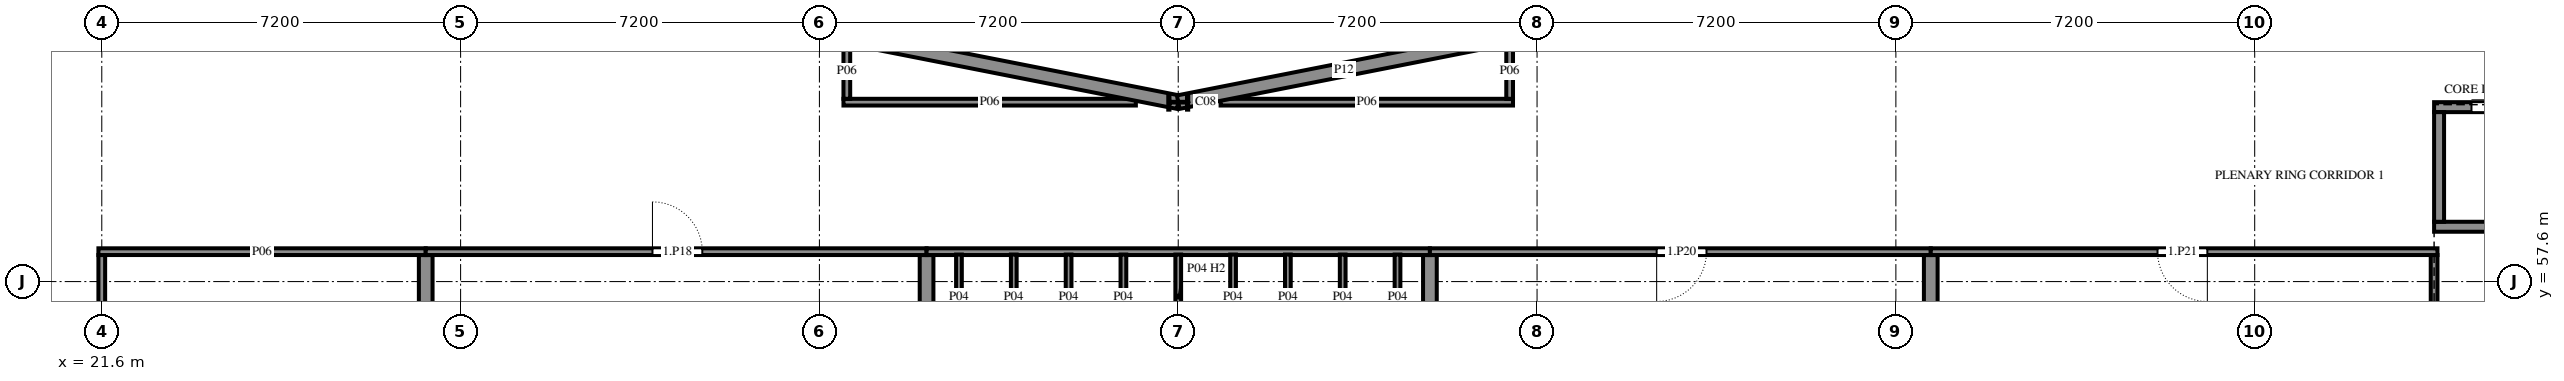
"""IFC4 building model, lengths in metres.
Left out: names, types, materials, properties, quantities, classifications, styles, units other than length and angle.
Written with IfcOpenShell. Run it as: python <this file> out.ifc"""

import sys

from ifc_helpers import new_model, si_unit, direction, frame, frame_2d, origin, origin_2d, place, context, subcontext, project, spatial, rectangle, i_section, extrude, element, fill, save


model = new_model("IFC4")
c1 = context("Model", 3, precision=1e-05, world=origin(), true_north=direction((0.0, 1.0)))
c2 = subcontext(c1, "Body", "Model", "MODEL_VIEW")
j1 = project(units=[si_unit("LENGTHUNIT", "METRE"), si_unit("PLANEANGLEUNIT", "RADIAN")], contexts=[c1])
p1 = place(None, origin())
s1 = spatial("IfcSite", under=j1, at=p1, CompositionType="ELEMENT")
p2 = place(p1, origin())
s2 = spatial("IfcBuilding", under=s1, at=p2, CompositionType="ELEMENT")
p3 = place(p2, frame((0.0, 0.0, 3.6)))
s3 = spatial("IfcBuildingStorey", under=s2, at=p3, CompositionType="ELEMENT", Elevation=3.6)
p4 = place(p3, frame((43.2, 61.2, 0.0), z_axis=(0.0, 0.0, 1.0), x_axis=(0.0, -1.0, 0.0)))
e1 = element("IfcColumn", 1, at=p4, inside=s3, PredefinedType="COLUMN", context=c2, shape_type="SweptSolid", body=[
    extrude(i_section(OverallWidth=0.3, OverallDepth=0.4, WebThickness=0.013, FlangeThickness=0.024, FilletRadius=0.027, at=origin_2d()), origin(), (0.0, 0.0, 1.0), 3.6),
])
p5 = place(p3, frame((68.4, 58.7, 0.0), z_axis=(0.0, 0.0, 1.0), x_axis=(1.0, 0.0, 0.0)))
e2 = element("IfcWall", 2, at=p5, inside=s3, PredefinedType="SHEAR", context=c2, shape_type="SweptSolid", body=[
    extrude(rectangle(XDim=2.6, YDim=0.2, at=frame_2d((1.3, 0.0))), origin(), (0.0, 0.0, 1.0), 3.6),
])
p6 = place(p3, frame((68.4, 61.1, 0.0), z_axis=(0.0, 0.0, 1.0), x_axis=(1.0, 0.0, 0.0)))
e3 = element("IfcWall", 3, at=p6, inside=s3, PredefinedType="SHEAR", context=c2, shape_type="SweptSolid", body=[
    extrude(rectangle(XDim=2.6, YDim=0.2, at=frame_2d((1.3, 0.0))), origin(), (0.0, 0.0, 1.0), 3.6),
])
p7 = place(p6, frame((0.75, 0.0, 0.0)))
e4 = element("IfcOpeningElement", 4, at=p7, cuts=e3, PredefinedType="OPENING", context=c2, shape_type="SweptSolid", body=[
    extrude(rectangle(XDim=1.1, YDim=2.1, at=frame_2d((0.55, 1.05))), frame((0.0, 0.11, 0.0), z_axis=(0.0, -1.0, 0.0), x_axis=(1.0, 0.0, 0.0)), (0.0, 0.0, 1.0), 0.22),
])
p8 = place(p3, frame((68.5, 58.8, 0.0), z_axis=(0.0, 0.0, 1.0), x_axis=(0.0, 1.0, 0.0)))
e5 = element("IfcWall", 5, at=p8, inside=s3, PredefinedType="SHEAR", context=c2, shape_type="SweptSolid", body=[
    extrude(rectangle(XDim=2.2, YDim=0.2, at=frame_2d((1.1, 0.0))), origin(), (0.0, 0.0, 1.0), 3.6),
])
p9 = place(p3, frame((68.4, 57.085, 0.0), z_axis=(0.0, 0.0, 1.0), x_axis=(0.0, 1.0, 0.0)))
e6 = element("IfcWall", 6, at=p9, inside=s3, PredefinedType="PARTITIONING", context=c2, shape_type="SweptSolid", body=[
    extrude(rectangle(XDim=1.048, YDim=0.135, at=frame_2d((0.524, 0.0))), origin(), (0.0, 0.0, 1.0), 3.42),
])
p10 = place(p3, frame((28.1, 58.133, 0.0), z_axis=(0.0, 0.0, 1.0), x_axis=(0.0, -1.0, 0.0)))
e7 = element("IfcWall", 7, at=p10, inside=s3, PredefinedType="PARTITIONING", context=c2, shape_type="SweptSolid", body=[
    extrude(rectangle(XDim=7.595, YDim=0.275, at=frame_2d((3.797, 0.0))), origin(), (0.0, 0.0, 1.0), 3.42),
])
p11 = place(p3, frame((21.6, 50.538, 0.0), z_axis=(0.0, 0.0, 1.0), x_axis=(0.0, 1.0, 0.0)))
e8 = element("IfcWall", 8, at=p11, inside=s3, PredefinedType="PARTITIONING", context=c2, shape_type="SweptSolid", body=[
    extrude(rectangle(XDim=7.595, YDim=0.135, at=frame_2d((3.797, 0.0))), origin(), (0.0, 0.0, 1.0), 2.42),
])
p12 = place(p11, frame((3.25, 0.0, 0.0)))
e9 = element("IfcOpeningElement", 9, at=p12, cuts=e8, PredefinedType="OPENING", context=c2, shape_type="SweptSolid", body=[
    extrude(rectangle(XDim=1.0, YDim=2.4, at=frame_2d((0.5, 1.2))), frame((0.0, 0.077, 0.0), z_axis=(0.0, -1.0, 0.0), x_axis=(1.0, 0.0, 0.0)), (0.0, 0.0, 1.0), 0.155),
])
p13 = place(p3, frame((21.532, 58.2, 0.0), z_axis=(0.0, 0.0, 1.0), x_axis=(1.0, 0.0, 0.0)))
e10 = element("IfcWall", 10, at=p13, inside=s3, PredefinedType="PARTITIONING", context=c2, shape_type="SweptSolid", body=[
    extrude(rectangle(XDim=6.568, YDim=0.135, at=frame_2d((3.284, 0.0))), origin(), (0.0, 0.0, 1.0), 3.42),
])
p14 = place(p3, frame((38.15, 58.133, 0.0), z_axis=(0.0, 0.0, 1.0), x_axis=(0.0, -1.0, 0.0)))
e11 = element("IfcWall", 11, at=p14, inside=s3, PredefinedType="PARTITIONING", context=c2, shape_type="SweptSolid", body=[
    extrude(rectangle(XDim=7.665, YDim=0.275, at=frame_2d((3.833, 0.0))), origin(), (0.0, 0.0, 1.0), 3.42),
])
p15 = place(p3, frame((28.1, 58.2, 0.0), z_axis=(0.0, 0.0, 1.0), x_axis=(1.0, 0.0, 0.0)))
e12 = element("IfcWall", 12, at=p15, inside=s3, PredefinedType="PARTITIONING", context=c2, shape_type="SweptSolid", body=[
    extrude(rectangle(XDim=10.05, YDim=0.135, at=frame_2d((5.025, 0.0))), origin(), (0.0, 0.0, 1.0), 3.42),
])
p16 = place(p15, frame((4.55, 0.0, 0.0)))
e13 = element("IfcOpeningElement", 13, at=p16, cuts=e12, PredefinedType="OPENING", context=c2, shape_type="SweptSolid", body=[
    extrude(rectangle(XDim=1.0, YDim=2.4, at=frame_2d((0.5, 1.2))), frame((0.0, 0.077, 0.0), z_axis=(0.0, -1.0, 0.0), x_axis=(1.0, 0.0, 0.0)), (0.0, 0.0, 1.0), 0.155),
])
p17 = place(p3, frame((48.25, 58.133, 0.0), z_axis=(0.0, 0.0, 1.0), x_axis=(0.0, -1.0, 0.0)))
e14 = element("IfcWall", 14, at=p17, inside=s3, PredefinedType="PARTITIONING", context=c2, shape_type="SweptSolid", body=[
    extrude(rectangle(XDim=7.665, YDim=0.275, at=frame_2d((3.833, 0.0))), origin(), (0.0, 0.0, 1.0), 3.42),
])
p18 = place(p3, frame((38.15, 58.2, 0.0), z_axis=(0.0, 0.0, 1.0), x_axis=(1.0, 0.0, 0.0)))
e15 = element("IfcWall", 15, at=p18, inside=s3, PredefinedType="PARTITIONING", context=c2, shape_type="SweptSolid", body=[
    extrude(rectangle(XDim=10.1, YDim=0.135, at=frame_2d((5.05, 0.0))), origin(), (0.0, 0.0, 1.0), 3.42),
])
p19 = place(p3, frame((58.3, 58.133, 0.0), z_axis=(0.0, 0.0, 1.0), x_axis=(0.0, -1.0, 0.0)))
e16 = element("IfcWall", 16, at=p19, inside=s3, PredefinedType="PARTITIONING", context=c2, shape_type="SweptSolid", body=[
    extrude(rectangle(XDim=7.665, YDim=0.275, at=frame_2d((3.833, 0.0))), origin(), (0.0, 0.0, 1.0), 3.42),
])
p20 = place(p3, frame((48.25, 58.2, 0.0), z_axis=(0.0, 0.0, 1.0), x_axis=(1.0, 0.0, 0.0)))
e17 = element("IfcWall", 17, at=p20, inside=s3, PredefinedType="PARTITIONING", context=c2, shape_type="SweptSolid", body=[
    extrude(rectangle(XDim=10.05, YDim=0.135, at=frame_2d((5.025, 0.0))), origin(), (0.0, 0.0, 1.0), 3.42),
])
p21 = place(p20, frame((4.55, 0.0, 0.0)))
e18 = element("IfcOpeningElement", 18, at=p21, cuts=e17, PredefinedType="OPENING", context=c2, shape_type="SweptSolid", body=[
    extrude(rectangle(XDim=1.0, YDim=2.4, at=frame_2d((0.5, 1.2))), frame((0.0, 0.077, 0.0), z_axis=(0.0, -1.0, 0.0), x_axis=(1.0, 0.0, 0.0)), (0.0, 0.0, 1.0), 0.155),
])
p22 = place(p3, frame((58.3, 58.2, 0.0), z_axis=(0.0, 0.0, 1.0), x_axis=(1.0, 0.0, 0.0)))
e19 = element("IfcWall", 19, at=p22, inside=s3, PredefinedType="PARTITIONING", context=c2, shape_type="SweptSolid", body=[
    extrude(rectangle(XDim=10.167, YDim=0.135, at=frame_2d((5.084, 0.0))), origin(), (0.0, 0.0, 1.0), 3.42),
])
p23 = place(p22, frame((4.55, 0.0, 0.0)))
e20 = element("IfcOpeningElement", 20, at=p23, cuts=e19, PredefinedType="OPENING", context=c2, shape_type="SweptSolid", body=[
    extrude(rectangle(XDim=1.0, YDim=2.4, at=frame_2d((0.5, 1.2))), frame((0.0, 0.077, 0.0), z_axis=(0.0, -1.0, 0.0), x_axis=(1.0, 0.0, 0.0)), (0.0, 0.0, 1.0), 0.155),
])
p24 = place(p3, frame((36.482, 61.2, 0.0), z_axis=(0.0, 0.0, 1.0), x_axis=(1.0, 0.0, 0.0)))
e21 = element("IfcWall", 21, at=p24, inside=s3, PredefinedType="PARTITIONING", context=c2, shape_type="SweptSolid", body=[
    extrude(rectangle(XDim=5.868, YDim=0.135, at=frame_2d((2.934, 0.0))), origin(), (0.0, 0.0, 1.0), 3.42),
])
p25 = place(p3, frame((44.05, 61.2, 0.0), z_axis=(0.0, 0.0, 1.0), x_axis=(1.0, 0.0, 0.0)))
e22 = element("IfcWall", 22, at=p25, inside=s3, PredefinedType="PARTITIONING", context=c2, shape_type="SweptSolid", body=[
    extrude(rectangle(XDim=5.867, YDim=0.135, at=frame_2d((2.934, 0.0))), origin(), (0.0, 0.0, 1.0), 3.42),
])
p26 = place(p3, frame((36.55, 62.372, 0.0), z_axis=(0.0, 0.0, 1.0), x_axis=(0.0, -1.0, 0.0)))
e23 = element("IfcWall", 23, at=p26, inside=s3, PredefinedType="PARTITIONING", context=c2, shape_type="SweptSolid", body=[
    extrude(rectangle(XDim=1.104, YDim=0.135, at=frame_2d((0.552, 0.0))), origin(), (0.0, 0.0, 1.0), 3.42),
])
p27 = place(p3, frame((36.55, 62.509, 0.0), z_axis=(0.0, 0.0, 1.0), x_axis=(0.981162344826, -0.193185022957, 0.0)))
e24 = element("IfcWall", 24, at=p27, inside=s3, PredefinedType="PARTITIONING", context=c2, shape_type="SweptSolid", body=[
    extrude(rectangle(XDim=6.778, YDim=0.275, at=frame_2d((3.389, 0.0))), origin(), (0.0, 0.0, 1.0), 3.07),
])
p28 = place(p3, frame((49.85, 61.268, 0.0), z_axis=(0.0, 0.0, 1.0), x_axis=(0.0, 1.0, 0.0)))
e25 = element("IfcWall", 25, at=p28, inside=s3, PredefinedType="PARTITIONING", context=c2, shape_type="SweptSolid", body=[
    extrude(rectangle(XDim=1.104, YDim=0.135, at=frame_2d((0.552, 0.0))), origin(), (0.0, 0.0, 1.0), 3.42),
])
p29 = place(p3, frame((43.2, 61.2, 0.0), z_axis=(0.0, 0.0, 1.0), x_axis=(0.981163689106, 0.193178195406, 0.0)))
e26 = element("IfcWall", 26, at=p29, inside=s3, PredefinedType="PARTITIONING", context=c2, shape_type="SweptSolid", body=[
    extrude(rectangle(XDim=6.778, YDim=0.275, at=frame_2d((3.389, 0.0))), origin(), (0.0, 0.0, 1.0), 3.07),
])
for number, where, z_axis, x_axis in (
    (27, (38.8, 58.143, 0.0), (0.0, 0.0, 1.0), (0.0, -1.0, 0.0)),
    (28, (39.9, 58.143, 0.0), (0.0, 0.0, 1.0), (0.0, -1.0, 0.0)),
    (29, (41.0, 58.143, 0.0), (0.0, 0.0, 1.0), (0.0, -1.0, 0.0)),
    (30, (42.1, 58.143, 0.0), (0.0, 0.0, 1.0), (0.0, -1.0, 0.0)),
):
    element("IfcWall", number, at=place(p3, frame(where, z_axis=z_axis, x_axis=x_axis)), inside=s3, PredefinedType="PARTITIONING", context=c2, shape_type="SweptSolid", body=[
        extrude(rectangle(XDim=1.685, YDim=0.115, at=frame_2d((0.843, 0.0))), origin(), (0.0, 0.0, 1.0), 3.42),
    ])
p30 = place(p3, frame((43.2, 58.143, 0.0), z_axis=(0.0, 0.0, 1.0), x_axis=(0.0, -1.0, 0.0)))
e31 = element("IfcWall", 31, at=p30, inside=s3, PredefinedType="PARTITIONING", context=c2, shape_type="SweptSolid", body=[
    extrude(rectangle(XDim=1.685, YDim=0.115, at=frame_2d((0.843, 0.0))), origin(), (0.0, 0.0, 1.0), 3.12),
])
for number, where, z_axis, x_axis in (
    (32, (44.3, 58.143, 0.0), (0.0, 0.0, 1.0), (0.0, -1.0, 0.0)),
    (33, (45.4, 58.143, 0.0), (0.0, 0.0, 1.0), (0.0, -1.0, 0.0)),
    (34, (46.5, 58.143, 0.0), (0.0, 0.0, 1.0), (0.0, -1.0, 0.0)),
    (35, (47.6, 58.143, 0.0), (0.0, 0.0, 1.0), (0.0, -1.0, 0.0)),
):
    element("IfcWall", number, at=place(p3, frame(where, z_axis=z_axis, x_axis=x_axis)), inside=s3, PredefinedType="PARTITIONING", context=c2, shape_type="SweptSolid", body=[
        extrude(rectangle(XDim=1.685, YDim=0.115, at=frame_2d((0.843, 0.0))), origin(), (0.0, 0.0, 1.0), 3.42),
    ])
p31 = place(p7, origin())
e36 = element("IfcDoor", 36, at=p31, inside=s3, OperationType="SLIDING_TO_LEFT", PredefinedType="DOOR", context=c2, shape_type="SweptSolid", body=[
    extrude(rectangle(XDim=1.1, YDim=2.1, at=frame_2d((0.55, 1.05))), frame((0.0, 0.025, 0.0), z_axis=(0.0, -1.0, 0.0), x_axis=(1.0, 0.0, 0.0)), (0.0, 0.0, 1.0), 0.05),
])
fill(e4, e36)
p32 = place(p16, origin())
e37 = element("IfcDoor", 37, at=p32, inside=s3, OperationType="SINGLE_SWING_RIGHT", PredefinedType="DOOR", context=c2, shape_type="SweptSolid", body=[
    extrude(rectangle(XDim=1.0, YDim=2.4, at=frame_2d((0.5, 1.2))), frame((0.0, 0.025, 0.0), z_axis=(0.0, -1.0, 0.0), x_axis=(1.0, 0.0, 0.0)), (0.0, 0.0, 1.0), 0.05),
])
fill(e13, e37)
p33 = place(p21, frame((1.0, 0.0, 0.0), z_axis=(0.0, 0.0, 1.0), x_axis=(-1.0, 0.0, 0.0)))
e38 = element("IfcDoor", 38, at=p33, inside=s3, OperationType="SINGLE_SWING_LEFT", PredefinedType="DOOR", context=c2, shape_type="SweptSolid", body=[
    extrude(rectangle(XDim=1.0, YDim=2.4, at=frame_2d((0.5, 1.2))), frame((0.0, 0.025, 0.0), z_axis=(0.0, -1.0, 0.0), x_axis=(1.0, 0.0, 0.0)), (0.0, 0.0, 1.0), 0.05),
])
fill(e18, e38)
p34 = place(p23, frame((1.0, 0.0, 0.0), z_axis=(0.0, 0.0, 1.0), x_axis=(-1.0, 0.0, 0.0)))
e39 = element("IfcDoor", 39, at=p34, inside=s3, OperationType="SINGLE_SWING_RIGHT", PredefinedType="DOOR", context=c2, shape_type="SweptSolid", body=[
    extrude(rectangle(XDim=1.0, YDim=2.4, at=frame_2d((0.5, 1.2))), frame((0.0, 0.025, 0.0), z_axis=(0.0, -1.0, 0.0), x_axis=(1.0, 0.0, 0.0)), (0.0, 0.0, 1.0), 0.05),
])
fill(e20, e39)
save(model, sys.argv[1])
